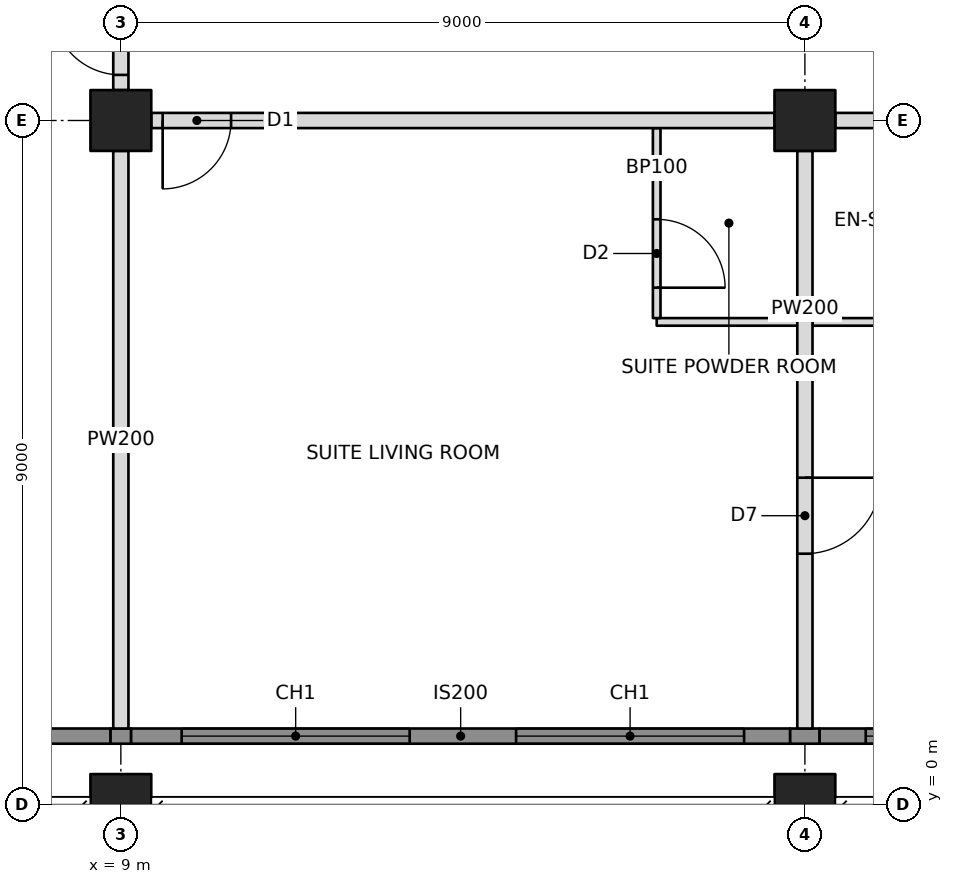
"""IFC4 building model, lengths in metres.
Left out: names, types, materials, properties, quantities, classifications, styles, units other than length and angle.
Written with IfcOpenShell. Run it as: python <this file> out.ifc"""

import sys

from ifc_helpers import new_model, si_unit, direction, frame, frame_2d, origin, origin_2d, place, context, subcontext, project, spatial, rectangle, hollow_rectangle, extrude, element, fill, save


model = new_model("IFC4")
c1 = context("Model", 3, precision=1e-05, world=origin(), true_north=direction((0.0, 1.0)))
c2 = subcontext(c1, "Body", "Model", "MODEL_VIEW")
j1 = project(units=[si_unit("LENGTHUNIT", "METRE"), si_unit("PLANEANGLEUNIT", "RADIAN")], contexts=[c1])
p1 = place(None, origin())
s1 = spatial("IfcSite", under=j1, at=p1, CompositionType="ELEMENT")
p2 = place(p1, origin())
s2 = spatial("IfcBuilding", under=s1, at=p2, CompositionType="ELEMENT")
p3 = place(p2, frame((0.0, 0.0, 214.8)))
s3 = spatial("IfcBuildingStorey", under=s2, at=p3, CompositionType="ELEMENT", Elevation=214.8)
p4 = place(p3, frame((9.0, 0.0, 0.0), z_axis=(0.0, 0.0, 1.0), x_axis=(1.0, 0.0, 0.0)))
e1 = element("IfcColumn", 1, at=p4, inside=s3, PredefinedType="COLUMN", context=c2, shape_type="SweptSolid", body=[
    extrude(hollow_rectangle(XDim=0.8, YDim=0.8, WallThickness=0.06, at=origin_2d()), origin(), (0.0, 0.0, 1.0), 3.4),
])
p5 = place(p3, frame((9.0, 9.0, 0.0), z_axis=(0.0, 0.0, 1.0), x_axis=(1.0, 0.0, 0.0)))
e2 = element("IfcColumn", 2, at=p5, inside=s3, PredefinedType="COLUMN", context=c2, shape_type="SweptSolid", body=[
    extrude(hollow_rectangle(XDim=0.8, YDim=0.8, WallThickness=0.05, at=origin_2d()), origin(), (0.0, 0.0, 1.0), 3.4),
])
p6 = place(p3, frame((18.0, 0.0, 0.0), z_axis=(0.0, 0.0, 1.0), x_axis=(1.0, 0.0, 0.0)))
e3 = element("IfcColumn", 3, at=p6, inside=s3, PredefinedType="COLUMN", context=c2, shape_type="SweptSolid", body=[
    extrude(hollow_rectangle(XDim=0.8, YDim=0.8, WallThickness=0.06, at=origin_2d()), origin(), (0.0, 0.0, 1.0), 3.4),
])
p7 = place(p3, frame((18.0, 9.0, 0.0), z_axis=(0.0, 0.0, 1.0), x_axis=(1.0, 0.0, 0.0)))
e4 = element("IfcColumn", 4, at=p7, inside=s3, PredefinedType="COLUMN", context=c2, shape_type="SweptSolid", body=[
    extrude(hollow_rectangle(XDim=0.8, YDim=0.8, WallThickness=0.05, at=origin_2d()), origin(), (0.0, 0.0, 1.0), 3.4),
])
p8 = place(p3, frame((3.0, 0.9, 0.0), z_axis=(0.0, 0.0, 1.0), x_axis=(1.0, 0.0, 0.0)))
e5 = element("IfcWall", 5, at=p8, inside=s3, PredefinedType="SOLIDWALL", context=c2, shape_type="SweptSolid", body=[
    extrude(rectangle(XDim=5.865, YDim=0.2, at=frame_2d((2.932, 0.0))), origin(), (0.0, 0.0, 1.0), 3.2),
])
p9 = place(p8, frame((1.45, 0.0, 0.6)))
e6 = element("IfcOpeningElement", 6, at=p9, cuts=e5, PredefinedType="OPENING", context=c2, shape_type="SweptSolid", body=[
    extrude(rectangle(XDim=3.0, YDim=2.2, at=frame_2d((1.5, 1.1))), frame((0.0, 0.11, 0.0), z_axis=(0.0, -1.0, 0.0), x_axis=(1.0, 0.0, 0.0)), (0.0, 0.0, 1.0), 0.22),
])
p10 = place(p3, frame((9.4, 9.0, 0.0), z_axis=(0.0, 0.0, 1.0), x_axis=(1.0, 0.0, 0.0)))
e7 = element("IfcWall", 7, at=p10, inside=s3, PredefinedType="PARTITIONING", context=c2, shape_type="SweptSolid", body=[
    extrude(rectangle(XDim=8.2, YDim=0.2, at=frame_2d((4.1, 0.0))), origin(), (0.0, 0.0, 1.0), 2.405),
])
p11 = place(p10, frame((0.15, 0.0, 0.0)))
e8 = element("IfcOpeningElement", 8, at=p11, cuts=e7, PredefinedType="OPENING", context=c2, shape_type="SweptSolid", body=[
    extrude(rectangle(XDim=0.9, YDim=2.1, at=frame_2d((0.45, 1.05))), frame((0.0, 0.11, 0.0), z_axis=(0.0, -1.0, 0.0), x_axis=(1.0, 0.0, 0.0)), (0.0, 0.0, 1.0), 0.22),
])
p12 = place(p3, frame((18.4, 9.0, 0.0), z_axis=(0.0, 0.0, 1.0), x_axis=(1.0, 0.0, 0.0)))
e9 = element("IfcWall", 9, at=p12, inside=s3, PredefinedType="PARTITIONING", context=c2, shape_type="SweptSolid", body=[
    extrude(rectangle(XDim=8.2, YDim=0.2, at=frame_2d((4.1, 0.0))), origin(), (0.0, 0.0, 1.0), 2.405),
])
p13 = place(p12, frame((2.95, 0.0, 0.0)))
e10 = element("IfcOpeningElement", 10, at=p13, cuts=e9, PredefinedType="OPENING", context=c2, shape_type="SweptSolid", body=[
    extrude(rectangle(XDim=0.9, YDim=2.1, at=frame_2d((0.45, 1.05))), frame((0.0, 0.11, 0.0), z_axis=(0.0, -1.0, 0.0), x_axis=(1.0, 0.0, 0.0)), (0.0, 0.0, 1.0), 0.22),
])
p14 = place(p12, frame((4.35, 0.0, 0.0)))
e11 = element("IfcOpeningElement", 11, at=p14, cuts=e9, PredefinedType="OPENING", context=c2, shape_type="SweptSolid", body=[
    extrude(rectangle(XDim=0.9, YDim=2.1, at=frame_2d((0.45, 1.05))), frame((0.0, 0.11, 0.0), z_axis=(0.0, -1.0, 0.0), x_axis=(1.0, 0.0, 0.0)), (0.0, 0.0, 1.0), 0.22),
])
p15 = place(p3, frame((9.0, 8.6, 0.0), z_axis=(0.0, 0.0, 1.0), x_axis=(0.0, -1.0, 0.0)))
e12 = element("IfcWall", 12, at=p15, inside=s3, PredefinedType="PARTITIONING", context=c2, shape_type="SweptSolid", body=[
    extrude(rectangle(XDim=7.6, YDim=0.2, at=frame_2d((3.8, 0.0))), origin(), (0.0, 0.0, 1.0), 2.438),
])
p16 = place(p3, frame((18.0, 8.6, 0.0), z_axis=(0.0, 0.0, 1.0), x_axis=(0.0, -1.0, 0.0)))
e13 = element("IfcWall", 13, at=p16, inside=s3, PredefinedType="PARTITIONING", context=c2, shape_type="SweptSolid", body=[
    extrude(rectangle(XDim=7.6, YDim=0.2, at=frame_2d((3.8, 0.0))), origin(), (0.0, 0.0, 1.0), 2.405),
])
p17 = place(p16, frame((4.3, 0.0, 0.0)))
e14 = element("IfcOpeningElement", 14, at=p17, cuts=e13, PredefinedType="OPENING", context=c2, shape_type="SweptSolid", body=[
    extrude(rectangle(XDim=1.0, YDim=2.1, at=frame_2d((0.5, 1.05))), frame((0.0, 0.11, 0.0), z_axis=(0.0, -1.0, 0.0), x_axis=(1.0, 0.0, 0.0)), (0.0, 0.0, 1.0), 0.22),
])
p18 = place(p3, frame((16.05, 6.35, 0.0), z_axis=(0.0, 0.0, 1.0), x_axis=(1.0, 0.0, 0.0)))
e15 = element("IfcWall", 15, at=p18, inside=s3, PredefinedType="PARTITIONING", context=c2, shape_type="SweptSolid", body=[
    extrude(rectangle(XDim=1.85, YDim=0.1, at=frame_2d((0.925, 0.0))), origin(), (0.0, 0.0, 1.0), 2.404),
])
p19 = place(p3, frame((16.05, 8.9, 0.0), z_axis=(0.0, 0.0, 1.0), x_axis=(0.0, -1.0, 0.0)))
e16 = element("IfcWall", 16, at=p19, inside=s3, PredefinedType="PARTITIONING", context=c2, shape_type="SweptSolid", body=[
    extrude(rectangle(XDim=2.5, YDim=0.1, at=frame_2d((1.25, 0.0))), origin(), (0.0, 0.0, 1.0), 2.404),
])
p20 = place(p19, frame((1.2, 0.0, 0.0)))
e17 = element("IfcOpeningElement", 17, at=p20, cuts=e16, PredefinedType="OPENING", context=c2, shape_type="SweptSolid", body=[
    extrude(rectangle(XDim=0.9, YDim=2.1, at=frame_2d((0.45, 1.05))), frame((0.0, 0.06, 0.0), z_axis=(0.0, -1.0, 0.0), x_axis=(1.0, 0.0, 0.0)), (0.0, 0.0, 1.0), 0.12),
])
p21 = place(p3, frame((18.1, 6.35, 0.0), z_axis=(0.0, 0.0, 1.0), x_axis=(1.0, 0.0, 0.0)))
e18 = element("IfcWall", 18, at=p21, inside=s3, PredefinedType="PARTITIONING", context=c2, shape_type="SweptSolid", body=[
    extrude(rectangle(XDim=2.95, YDim=0.1, at=frame_2d((1.475, 0.0))), origin(), (0.0, 0.0, 1.0), 2.404),
])
p22 = place(p3, frame((9.0, 9.4, 0.0), z_axis=(0.0, 0.0, 1.0), x_axis=(0.0, 1.0, 0.0)))
e19 = element("IfcWall", 19, at=p22, inside=s3, PredefinedType="PARTITIONING", context=c2, shape_type="SweptSolid", body=[
    extrude(rectangle(XDim=1.3, YDim=0.2, at=frame_2d((0.65, 0.0))), origin(), (0.0, 0.0, 1.0), 2.405),
])
p23 = place(p22, frame((0.2, 0.0, 0.0)))
e20 = element("IfcOpeningElement", 20, at=p23, cuts=e19, PredefinedType="OPENING", context=c2, shape_type="SweptSolid", body=[
    extrude(rectangle(XDim=0.9, YDim=2.1, at=frame_2d((0.45, 1.05))), frame((0.0, 0.11, 0.0), z_axis=(0.0, -1.0, 0.0), x_axis=(1.0, 0.0, 0.0)), (0.0, 0.0, 1.0), 0.22),
])
p24 = place(p3, frame((8.865, 0.9, 0.0), z_axis=(0.0, 0.0, 1.0), x_axis=(1.0, 0.0, 0.0)))
e21 = element("IfcWall", 21, at=p24, inside=s3, PredefinedType="SOLIDWALL", context=c2, shape_type="SweptSolid", body=[
    extrude(rectangle(XDim=0.271, YDim=0.2, at=frame_2d((0.135, 0.0))), origin(), (0.0, 0.0, 1.0), 2.438),
])
p25 = place(p3, frame((9.135, 0.9, 0.0), z_axis=(0.0, 0.0, 1.0), x_axis=(1.0, 0.0, 0.0)))
e22 = element("IfcWall", 22, at=p25, inside=s3, PredefinedType="SOLIDWALL", context=c2, shape_type="SweptSolid", body=[
    extrude(rectangle(XDim=8.671, YDim=0.2, at=frame_2d((4.335, 0.0))), origin(), (0.0, 0.0, 1.0), 3.2),
])
p26 = place(p25, frame((0.665, 0.0, 0.6)))
e23 = element("IfcOpeningElement", 23, at=p26, cuts=e22, PredefinedType="OPENING", context=c2, shape_type="SweptSolid", body=[
    extrude(rectangle(XDim=3.0, YDim=2.2, at=frame_2d((1.5, 1.1))), frame((0.0, 0.11, 0.0), z_axis=(0.0, -1.0, 0.0), x_axis=(1.0, 0.0, 0.0)), (0.0, 0.0, 1.0), 0.22),
])
p27 = place(p25, frame((5.065, 0.0, 0.6)))
e24 = element("IfcOpeningElement", 24, at=p27, cuts=e22, PredefinedType="OPENING", context=c2, shape_type="SweptSolid", body=[
    extrude(rectangle(XDim=3.0, YDim=2.2, at=frame_2d((1.5, 1.1))), frame((0.0, 0.11, 0.0), z_axis=(0.0, -1.0, 0.0), x_axis=(1.0, 0.0, 0.0)), (0.0, 0.0, 1.0), 0.22),
])
p28 = place(p3, frame((17.806, 0.9, 0.0), z_axis=(0.0, 0.0, 1.0), x_axis=(1.0, 0.0, 0.0)))
e25 = element("IfcWall", 25, at=p28, inside=s3, PredefinedType="SOLIDWALL", context=c2, shape_type="SweptSolid", body=[
    extrude(rectangle(XDim=0.388, YDim=0.2, at=frame_2d((0.194, 0.0))), origin(), (0.0, 0.0, 1.0), 2.404),
])
p29 = place(p3, frame((18.194, 0.9, 0.0), z_axis=(0.0, 0.0, 1.0), x_axis=(1.0, 0.0, 0.0)))
e26 = element("IfcWall", 26, at=p29, inside=s3, PredefinedType="SOLIDWALL", context=c2, shape_type="SweptSolid", body=[
    extrude(rectangle(XDim=8.612, YDim=0.2, at=frame_2d((4.306, 0.0))), origin(), (0.0, 0.0, 1.0), 3.2),
])
p30 = place(p29, frame((0.606, 0.0, 0.6)))
e27 = element("IfcOpeningElement", 27, at=p30, cuts=e26, PredefinedType="OPENING", context=c2, shape_type="SweptSolid", body=[
    extrude(rectangle(XDim=3.0, YDim=2.2, at=frame_2d((1.5, 1.1))), frame((0.0, 0.11, 0.0), z_axis=(0.0, -1.0, 0.0), x_axis=(1.0, 0.0, 0.0)), (0.0, 0.0, 1.0), 0.22),
])
p31 = place(p29, frame((5.006, 0.0, 0.6)))
e28 = element("IfcOpeningElement", 28, at=p31, cuts=e26, PredefinedType="OPENING", context=c2, shape_type="SweptSolid", body=[
    extrude(rectangle(XDim=3.0, YDim=2.2, at=frame_2d((1.5, 1.1))), frame((0.0, 0.11, 0.0), z_axis=(0.0, -1.0, 0.0), x_axis=(1.0, 0.0, 0.0)), (0.0, 0.0, 1.0), 0.22),
])
p32 = place(p26, origin())
e29 = element("IfcWindow", 29, at=p32, inside=s3, PartitioningType="TRIPLE_PANEL_VERTICAL", PredefinedType="WINDOW", context=c2, shape_type="SweptSolid", body=[
    extrude(rectangle(XDim=3.0, YDim=2.2, at=frame_2d((1.5, 1.1))), frame((0.0, 0.03, 0.0), z_axis=(0.0, -1.0, 0.0), x_axis=(1.0, 0.0, 0.0)), (0.0, 0.0, 1.0), 0.06),
])
fill(e23, e29)
p33 = place(p27, origin())
e30 = element("IfcWindow", 30, at=p33, inside=s3, PartitioningType="TRIPLE_PANEL_VERTICAL", PredefinedType="WINDOW", context=c2, shape_type="SweptSolid", body=[
    extrude(rectangle(XDim=3.0, YDim=2.2, at=frame_2d((1.5, 1.1))), frame((0.0, 0.03, 0.0), z_axis=(0.0, -1.0, 0.0), x_axis=(1.0, 0.0, 0.0)), (0.0, 0.0, 1.0), 0.06),
])
fill(e24, e30)
p34 = place(p30, origin())
e31 = element("IfcWindow", 31, at=p34, inside=s3, PartitioningType="TRIPLE_PANEL_VERTICAL", PredefinedType="WINDOW", context=c2, shape_type="SweptSolid", body=[
    extrude(rectangle(XDim=3.0, YDim=2.2, at=frame_2d((1.5, 1.1))), frame((0.0, 0.03, 0.0), z_axis=(0.0, -1.0, 0.0), x_axis=(1.0, 0.0, 0.0)), (0.0, 0.0, 1.0), 0.06),
])
fill(e27, e31)
p35 = place(p17, origin())
e32 = element("IfcDoor", 32, at=p35, inside=s3, OperationType="SINGLE_SWING_LEFT", PredefinedType="DOOR", context=c2, shape_type="SweptSolid", body=[
    extrude(rectangle(XDim=1.0, YDim=2.1, at=frame_2d((0.5, 1.05))), frame((0.0, 0.025, 0.0), z_axis=(0.0, -1.0, 0.0), x_axis=(1.0, 0.0, 0.0)), (0.0, 0.0, 1.0), 0.05),
])
fill(e14, e32)
p36 = place(p20, origin())
e33 = element("IfcDoor", 33, at=p36, inside=s3, OperationType="SINGLE_SWING_RIGHT", PredefinedType="DOOR", context=c2, shape_type="SweptSolid", body=[
    extrude(rectangle(XDim=0.9, YDim=2.1, at=frame_2d((0.45, 1.05))), frame((0.0, 0.025, 0.0), z_axis=(0.0, -1.0, 0.0), x_axis=(1.0, 0.0, 0.0)), (0.0, 0.0, 1.0), 0.05),
])
fill(e17, e33)
p37 = place(p11, frame((0.9, 0.0, 0.0), z_axis=(0.0, 0.0, 1.0), x_axis=(-1.0, 0.0, 0.0)))
e34 = element("IfcDoor", 34, at=p37, inside=s3, OperationType="SINGLE_SWING_RIGHT", PredefinedType="DOOR", context=c2, shape_type="SweptSolid", body=[
    extrude(rectangle(XDim=0.9, YDim=2.1, at=frame_2d((0.45, 1.05))), frame((0.0, 0.025, 0.0), z_axis=(0.0, -1.0, 0.0), x_axis=(1.0, 0.0, 0.0)), (0.0, 0.0, 1.0), 0.05),
])
fill(e8, e34)
p38 = place(p23, origin())
e35 = element("IfcDoor", 35, at=p38, inside=s3, OperationType="SINGLE_SWING_RIGHT", PredefinedType="DOOR", context=c2, shape_type="SweptSolid", body=[
    extrude(rectangle(XDim=0.9, YDim=2.1, at=frame_2d((0.45, 1.05))), frame((0.0, 0.025, 0.0), z_axis=(0.0, -1.0, 0.0), x_axis=(1.0, 0.0, 0.0)), (0.0, 0.0, 1.0), 0.05),
])
fill(e20, e35)
save(model, sys.argv[1])
